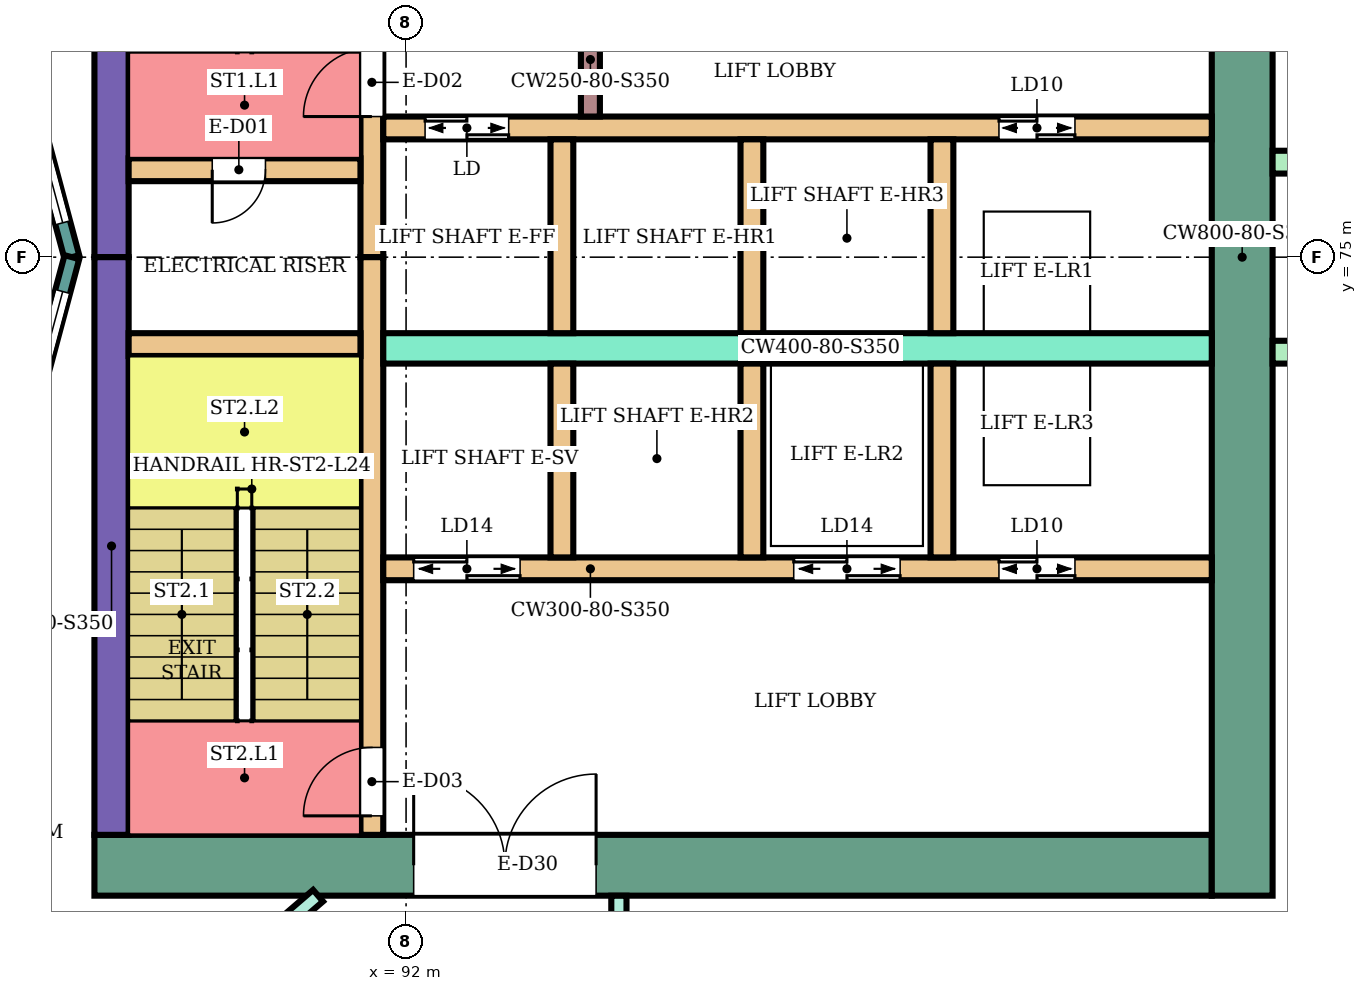
"""IFC4 building model, lengths in metres.
Left out: names, types, materials, properties, quantities, classifications, styles, units other than length and angle.
Written with IfcOpenShell. Run it as: python <this file> out.ifc"""

import sys

from ifc_helpers import new_model, si_unit, direction, frame, frame_2d, origin, place, context, subcontext, project, spatial, rectangle, extrude, element, fill, save


model = new_model("IFC4")
c1 = context("Model", 3, precision=1e-05, world=origin(), true_north=direction((0.0, 1.0)))
c2 = subcontext(c1, "Body", "Model", "MODEL_VIEW")
j1 = project(units=[si_unit("LENGTHUNIT", "METRE"), si_unit("PLANEANGLEUNIT", "RADIAN")], contexts=[c1])
p1 = place(None, origin())
s1 = spatial("IfcSite", under=j1, at=p1, CompositionType="ELEMENT")
p2 = place(p1, origin())
s2 = spatial("IfcBuilding", under=s1, at=p2, CompositionType="ELEMENT")
p3 = place(p2, frame((0.0, 0.0, 105.2)))
s3 = spatial("IfcBuildingStorey", under=s2, at=p3, CompositionType="ELEMENT", Elevation=105.2)
p4 = place(p3, frame((87.9, 67.0, 0.0), z_axis=(0.0, 0.0, 1.0), x_axis=(1.0, 0.0, 0.0)))
e1 = element("IfcWall", 1, at=p4, inside=s3, PredefinedType="SHEAR", context=c2, shape_type="SweptSolid", body=[
    extrude(rectangle(XDim=14.7, YDim=0.8, at=frame_2d((7.35, 0.0))), origin(), (0.0, 0.0, 1.0), 3.45),
])
p5 = place(p4, frame((4.2, 0.0, 0.0)))
e2 = element("IfcOpeningElement", 2, at=p5, cuts=e1, PredefinedType="OPENING", context=c2, shape_type="SweptSolid", body=[
    extrude(rectangle(XDim=2.4, YDim=2.4, at=frame_2d((1.2, 1.2))), frame((0.0, 0.41, 0.0), z_axis=(0.0, -1.0, 0.0), x_axis=(1.0, 0.0, 0.0)), (0.0, 0.0, 1.0), 0.82),
])
for number, where, z_axis, x_axis in (
    (3, (88.125, 75.0, 0.0), (0.0, 0.0, 1.0), (0.0, 1.0, 0.0)),
    (4, (88.125, 67.4, 0.0), (0.0, 0.0, 1.0), (0.0, 1.0, 0.0)),
):
    element("IfcWall", number, at=place(p3, frame(where, z_axis=z_axis, x_axis=x_axis)), inside=s3, PredefinedType="SHEAR", context=c2, shape_type="SweptSolid", body=[
        extrude(rectangle(XDim=7.6, YDim=0.45, at=frame_2d((3.8, 0.0))), origin(), (0.0, 0.0, 1.0), 3.45),
    ])
p6 = place(p3, frame((103.0, 66.6, 0.0), z_axis=(0.0, 0.0, 1.0), x_axis=(0.0, 1.0, 0.0)))
e5 = element("IfcWall", 5, at=p6, inside=s3, PredefinedType="SHEAR", context=c2, shape_type="SweptSolid", body=[
    extrude(rectangle(XDim=16.8, YDim=0.8, at=frame_2d((8.4, 0.0))), origin(), (0.0, 0.0, 1.0), 3.45),
])
p7 = place(p3, frame((91.55, 75.0, 0.0), z_axis=(0.0, 0.0, 1.0), x_axis=(0.0, 1.0, 0.0)))
e6 = element("IfcWall", 6, at=p7, inside=s3, PredefinedType="SHEAR", context=c2, shape_type="SweptSolid", body=[
    extrude(rectangle(XDim=7.6, YDim=0.3, at=frame_2d((3.8, 0.0))), origin(), (0.0, 0.0, 1.0), 3.45),
])
p8 = place(p7, frame((1.85, 0.0, 0.0)))
e7 = element("IfcOpeningElement", 7, at=p8, cuts=e6, PredefinedType="OPENING", context=c2, shape_type="SweptSolid", body=[
    extrude(rectangle(XDim=0.9, YDim=2.1, at=frame_2d((0.45, 1.05))), frame((0.0, 0.16, 0.0), z_axis=(0.0, -1.0, 0.0), x_axis=(1.0, 0.0, 0.0)), (0.0, 0.0, 1.0), 0.32),
])
p9 = place(p3, frame((91.55, 67.4, 0.0), z_axis=(0.0, 0.0, 1.0), x_axis=(0.0, 1.0, 0.0)))
e8 = element("IfcWall", 8, at=p9, inside=s3, PredefinedType="SHEAR", context=c2, shape_type="SweptSolid", body=[
    extrude(rectangle(XDim=7.6, YDim=0.3, at=frame_2d((3.8, 0.0))), origin(), (0.0, 0.0, 1.0), 3.45),
])
p10 = place(p9, frame((0.25, 0.0, 0.0)))
e9 = element("IfcOpeningElement", 9, at=p10, cuts=e8, PredefinedType="OPENING", context=c2, shape_type="SweptSolid", body=[
    extrude(rectangle(XDim=0.9, YDim=2.1, at=frame_2d((0.45, 1.05))), frame((0.0, 0.16, 0.0), z_axis=(0.0, -1.0, 0.0), x_axis=(1.0, 0.0, 0.0)), (0.0, 0.0, 1.0), 0.32),
])
p11 = place(p3, frame((88.35, 76.15, 0.0), z_axis=(0.0, 0.0, 1.0), x_axis=(1.0, 0.0, 0.0)))
e10 = element("IfcWall", 10, at=p11, inside=s3, PredefinedType="SHEAR", context=c2, shape_type="SweptSolid", body=[
    extrude(rectangle(XDim=3.05, YDim=0.3, at=frame_2d((1.525, 0.0))), origin(), (0.0, 0.0, 1.0), 3.45),
])
p12 = place(p11, frame((1.1, 0.0, 0.0)))
e11 = element("IfcOpeningElement", 11, at=p12, cuts=e10, PredefinedType="OPENING", context=c2, shape_type="SweptSolid", body=[
    extrude(rectangle(XDim=0.7, YDim=2.0, at=frame_2d((0.35, 1.0))), frame((0.0, 0.16, 0.0), z_axis=(0.0, -1.0, 0.0), x_axis=(1.0, 0.0, 0.0)), (0.0, 0.0, 1.0), 0.32),
])
p13 = place(p3, frame((88.35, 73.85, 0.0), z_axis=(0.0, 0.0, 1.0), x_axis=(1.0, 0.0, 0.0)))
e12 = element("IfcWall", 12, at=p13, inside=s3, PredefinedType="SHEAR", context=c2, shape_type="SweptSolid", body=[
    extrude(rectangle(XDim=3.05, YDim=0.3, at=frame_2d((1.525, 0.0))), origin(), (0.0, 0.0, 1.0), 3.45),
])
p14 = place(p3, frame((91.7, 76.7, 0.0), z_axis=(0.0, 0.0, 1.0), x_axis=(1.0, 0.0, 0.0)))
e13 = element("IfcWall", 13, at=p14, inside=s3, PredefinedType="SHEAR", context=c2, shape_type="SweptSolid", body=[
    extrude(rectangle(XDim=10.9, YDim=0.3, at=frame_2d((5.45, 0.0))), origin(), (0.0, 0.0, 1.0), 3.45),
])
p15 = place(p14, frame((0.55, 0.0, 0.0)))
e14 = element("IfcOpeningElement", 14, at=p15, cuts=e13, PredefinedType="OPENING", context=c2, shape_type="SweptSolid", body=[
    extrude(rectangle(XDim=1.1, YDim=2.1, at=frame_2d((0.55, 1.05))), frame((0.0, 0.16, 0.0), z_axis=(0.0, -1.0, 0.0), x_axis=(1.0, 0.0, 0.0)), (0.0, 0.0, 1.0), 0.32),
])
p16 = place(p14, frame((8.1, 0.0, 0.0)))
e15 = element("IfcOpeningElement", 15, at=p16, cuts=e13, PredefinedType="OPENING", context=c2, shape_type="SweptSolid", body=[
    extrude(rectangle(XDim=1.0, YDim=2.1, at=frame_2d((0.5, 1.05))), frame((0.0, 0.16, 0.0), z_axis=(0.0, -1.0, 0.0), x_axis=(1.0, 0.0, 0.0)), (0.0, 0.0, 1.0), 0.32),
])
p17 = place(p3, frame((91.7, 73.8, 0.0), z_axis=(0.0, 0.0, 1.0), x_axis=(1.0, 0.0, 0.0)))
e16 = element("IfcWall", 16, at=p17, inside=s3, PredefinedType="SHEAR", context=c2, shape_type="SweptSolid", body=[
    extrude(rectangle(XDim=10.9, YDim=0.4, at=frame_2d((5.45, 0.0))), origin(), (0.0, 0.0, 1.0), 3.45),
])
p18 = place(p3, frame((91.7, 70.9, 0.0), z_axis=(0.0, 0.0, 1.0), x_axis=(1.0, 0.0, 0.0)))
e17 = element("IfcWall", 17, at=p18, inside=s3, PredefinedType="SHEAR", context=c2, shape_type="SweptSolid", body=[
    extrude(rectangle(XDim=10.9, YDim=0.3, at=frame_2d((5.45, 0.0))), origin(), (0.0, 0.0, 1.0), 3.45),
])
p19 = place(p18, frame((0.4, 0.0, 0.0)))
e18 = element("IfcOpeningElement", 18, at=p19, cuts=e17, PredefinedType="OPENING", context=c2, shape_type="SweptSolid", body=[
    extrude(rectangle(XDim=1.4, YDim=2.1, at=frame_2d((0.7, 1.05))), frame((0.0, 0.16, 0.0), z_axis=(0.0, -1.0, 0.0), x_axis=(1.0, 0.0, 0.0)), (0.0, 0.0, 1.0), 0.32),
])
p20 = place(p18, frame((5.4, 0.0, 0.0)))
e19 = element("IfcOpeningElement", 19, at=p20, cuts=e17, PredefinedType="OPENING", context=c2, shape_type="SweptSolid", body=[
    extrude(rectangle(XDim=1.4, YDim=2.1, at=frame_2d((0.7, 1.05))), frame((0.0, 0.16, 0.0), z_axis=(0.0, -1.0, 0.0), x_axis=(1.0, 0.0, 0.0)), (0.0, 0.0, 1.0), 0.32),
])
p21 = place(p18, frame((8.1, 0.0, 0.0)))
e20 = element("IfcOpeningElement", 20, at=p21, cuts=e17, PredefinedType="OPENING", context=c2, shape_type="SweptSolid", body=[
    extrude(rectangle(XDim=1.0, YDim=2.1, at=frame_2d((0.5, 1.05))), frame((0.0, 0.16, 0.0), z_axis=(0.0, -1.0, 0.0), x_axis=(1.0, 0.0, 0.0)), (0.0, 0.0, 1.0), 0.32),
])
for number, where, z_axis, x_axis in (
    (21, (94.05, 74.0, 0.0), (0.0, 0.0, 1.0), (0.0, 1.0, 0.0)),
    (22, (96.55, 74.0, 0.0), (0.0, 0.0, 1.0), (0.0, 1.0, 0.0)),
    (23, (99.05, 74.0, 0.0), (0.0, 0.0, 1.0), (0.0, 1.0, 0.0)),
    (24, (94.05, 71.05, 0.0), (0.0, 0.0, 1.0), (0.0, 1.0, 0.0)),
    (25, (96.55, 71.05, 0.0), (0.0, 0.0, 1.0), (0.0, 1.0, 0.0)),
    (26, (99.05, 71.05, 0.0), (0.0, 0.0, 1.0), (0.0, 1.0, 0.0)),
):
    element("IfcWall", number, at=place(p3, frame(where, z_axis=z_axis, x_axis=x_axis)), inside=s3, PredefinedType="SHEAR", context=c2, shape_type="SweptSolid", body=[
        extrude(rectangle(XDim=2.55, YDim=0.3, at=frame_2d((1.275, 0.0))), origin(), (0.0, 0.0, 1.0), 3.45),
    ])
p22 = place(p3, frame((94.425, 76.85, 0.0), z_axis=(0.0, 0.0, 1.0), x_axis=(0.0, 1.0, 0.0)))
e27 = element("IfcWall", 27, at=p22, inside=s3, PredefinedType="SHEAR", context=c2, shape_type="SweptSolid", body=[
    extrude(rectangle(XDim=1.5, YDim=0.25, at=frame_2d((0.75, 0.0))), origin(), (0.0, 0.0, 1.0), 3.45),
])
for number, where, z_axis, x_axis in (
    (28, (103.4, 73.75, 0.0), (0.0, 0.0, 1.0), (1.0, 0.0, 0.0)),
    (29, (103.4, 76.25, 0.0), (0.0, 0.0, 1.0), (1.0, 0.0, 0.0)),
):
    element("IfcWall", number, at=place(p3, frame(where, z_axis=z_axis, x_axis=x_axis)), inside=s3, PredefinedType="NOTDEFINED", context=c2, shape_type="SweptSolid", body=[
        extrude(rectangle(XDim=2.416, YDim=0.3, at=frame_2d((1.208, 0.0))), origin(), (0.0, 0.0, 1.0), 3.8),
    ])
p23 = place(p3, frame((87.604, 75.0, 0.0), z_axis=(0.0, 0.0, 1.0), x_axis=(-0.258789828301, 0.965933654434, 0.0)))
e30 = element("IfcWall", 30, at=p23, inside=s3, PredefinedType="NOTDEFINED", context=c2, shape_type="SweptSolid", body=[
    extrude(rectangle(XDim=3.936, YDim=0.2, at=frame_2d((1.968, 0.0))), origin(), (0.0, 0.0, 1.0), 3.8),
])
p24 = place(p23, frame((0.468, 0.0, 0.9)))
e31 = element("IfcOpeningElement", 31, at=p24, cuts=e30, PredefinedType="OPENING", context=c2, shape_type="SweptSolid", body=[
    extrude(rectangle(XDim=3.0, YDim=2.3, at=frame_2d((1.5, 1.15))), frame((0.0, 0.11, 0.0), z_axis=(0.0, -1.0, 0.0), x_axis=(1.0, 0.0, 0.0)), (0.0, 0.0, 1.0), 0.22),
])
p25 = place(p3, frame((86.585, 71.198, 0.0), z_axis=(0.0, 0.0, 1.0), x_axis=(0.258789828301, 0.965933654434, 0.0)))
e32 = element("IfcWall", 32, at=p25, inside=s3, PredefinedType="NOTDEFINED", context=c2, shape_type="SweptSolid", body=[
    extrude(rectangle(XDim=3.936, YDim=0.2, at=frame_2d((1.968, 0.0))), origin(), (0.0, 0.0, 1.0), 3.8),
])
p26 = place(p25, frame((0.468, 0.0, 0.9)))
e33 = element("IfcOpeningElement", 33, at=p26, cuts=e32, PredefinedType="OPENING", context=c2, shape_type="SweptSolid", body=[
    extrude(rectangle(XDim=3.0, YDim=2.3, at=frame_2d((1.5, 1.15))), frame((0.0, 0.11, 0.0), z_axis=(0.0, -1.0, 0.0), x_axis=(1.0, 0.0, 0.0)), (0.0, 0.0, 1.0), 0.22),
])
p27 = place(p3, frame((86.877, 63.189, 0.0), z_axis=(0.0, 0.0, 1.0), x_axis=(0.758164888471, 0.652062881853, 0.0)))
e34 = element("IfcWall", 34, at=p27, inside=s3, PredefinedType="PARTITIONING", context=c2, shape_type="SweptSolid", body=[
    extrude(rectangle(XDim=5.23, YDim=0.2, at=frame_2d((2.615, 0.0))), origin(), (0.0, 0.0, 1.0), 3.35),
])
p28 = place(p27, frame((2.63, 0.0, 0.0)))
e35 = element("IfcOpeningElement", 35, at=p28, cuts=e34, PredefinedType="OPENING", context=c2, shape_type="SweptSolid", body=[
    extrude(rectangle(XDim=1.0, YDim=2.1, at=frame_2d((0.5, 1.05))), frame((0.0, 0.11, 0.0), z_axis=(0.0, -1.0, 0.0), x_axis=(1.0, 0.0, 0.0)), (0.0, 0.0, 1.0), 0.22),
])
p29 = place(p3, frame((94.8, 65.1, 0.0), z_axis=(0.0, 0.0, 1.0), x_axis=(0.0, 1.0, 0.0)))
e36 = element("IfcWall", 36, at=p29, inside=s3, PredefinedType="PARTITIONING", context=c2, shape_type="SweptSolid", body=[
    extrude(rectangle(XDim=1.499, YDim=0.2, at=frame_2d((0.75, 0.0))), origin(), (0.0, 0.0, 1.0), 3.35),
])
p30 = place(p3, frame((86.643, 66.681, 0.0), z_axis=(0.0, 0.0, 1.0), x_axis=(0.652264876065, -0.757991115682, 0.0)))
e37 = element("IfcWall", 37, at=p30, inside=s3, PredefinedType="PARTITIONING", context=c2, shape_type="SweptSolid", body=[
    extrude(rectangle(XDim=2.699, YDim=0.1, at=frame_2d((1.35, 0.0))), origin(), (0.0, 0.0, 1.0), 3.35),
])
p31 = place(p30, frame((1.3, 0.0, 0.0)))
e38 = element("IfcOpeningElement", 38, at=p31, cuts=e37, PredefinedType="OPENING", context=c2, shape_type="SweptSolid", body=[
    extrude(rectangle(XDim=0.8, YDim=2.1, at=frame_2d((0.4, 1.05))), frame((0.0, 0.06, 0.0), z_axis=(0.0, -1.0, 0.0), x_axis=(1.0, 0.0, 0.0)), (0.0, 0.0, 1.0), 0.12),
])
p32 = place(p24, origin())
e39 = element("IfcWindow", 39, at=p32, inside=s3, PartitioningType="SINGLE_PANEL", PredefinedType="WINDOW", context=c2, shape_type="SweptSolid", body=[
    extrude(rectangle(XDim=3.0, YDim=2.3, at=frame_2d((1.5, 1.15))), frame((0.0, 0.03, 0.0), z_axis=(0.0, -1.0, 0.0), x_axis=(1.0, 0.0, 0.0)), (0.0, 0.0, 1.0), 0.06),
])
fill(e31, e39)
p33 = place(p26, origin())
e40 = element("IfcWindow", 40, at=p33, inside=s3, PartitioningType="SINGLE_PANEL", PredefinedType="WINDOW", context=c2, shape_type="SweptSolid", body=[
    extrude(rectangle(XDim=3.0, YDim=2.3, at=frame_2d((1.5, 1.15))), frame((0.0, 0.03, 0.0), z_axis=(0.0, -1.0, 0.0), x_axis=(1.0, 0.0, 0.0)), (0.0, 0.0, 1.0), 0.06),
])
fill(e33, e40)
p34 = place(p12, frame((0.7, 0.0, 0.0), z_axis=(0.0, 0.0, 1.0), x_axis=(-1.0, 0.0, 0.0)))
e41 = element("IfcDoor", 41, at=p34, inside=s3, OperationType="SINGLE_SWING_RIGHT", PredefinedType="DOOR", context=c2, shape_type="SweptSolid", body=[
    extrude(rectangle(XDim=0.7, YDim=2.0, at=frame_2d((0.35, 1.0))), frame((0.0, 0.025, 0.0), z_axis=(0.0, -1.0, 0.0), x_axis=(1.0, 0.0, 0.0)), (0.0, 0.0, 1.0), 0.05),
])
fill(e11, e41)
p35 = place(p8, origin())
e42 = element("IfcDoor", 42, at=p35, inside=s3, OperationType="SINGLE_SWING_LEFT", PredefinedType="DOOR", context=c2, shape_type="SweptSolid", body=[
    extrude(rectangle(XDim=0.9, YDim=2.1, at=frame_2d((0.45, 1.05))), frame((0.0, 0.025, 0.0), z_axis=(0.0, -1.0, 0.0), x_axis=(1.0, 0.0, 0.0)), (0.0, 0.0, 1.0), 0.05),
])
fill(e7, e42)
p36 = place(p10, origin())
e43 = element("IfcDoor", 43, at=p36, inside=s3, OperationType="SINGLE_SWING_LEFT", PredefinedType="DOOR", context=c2, shape_type="SweptSolid", body=[
    extrude(rectangle(XDim=0.9, YDim=2.1, at=frame_2d((0.45, 1.05))), frame((0.0, 0.025, 0.0), z_axis=(0.0, -1.0, 0.0), x_axis=(1.0, 0.0, 0.0)), (0.0, 0.0, 1.0), 0.05),
])
fill(e9, e43)
p37 = place(p15, origin())
e44 = element("IfcDoor", 44, at=p37, inside=s3, OperationType="DOUBLE_DOOR_SLIDING", PredefinedType="DOOR", context=c2, shape_type="SweptSolid", body=[
    extrude(rectangle(XDim=1.1, YDim=2.1, at=frame_2d((0.55, 1.05))), frame((0.0, 0.025, 0.0), z_axis=(0.0, -1.0, 0.0), x_axis=(1.0, 0.0, 0.0)), (0.0, 0.0, 1.0), 0.05),
])
fill(e14, e44)
p38 = place(p16, origin())
e45 = element("IfcDoor", 45, at=p38, inside=s3, OperationType="DOUBLE_DOOR_SLIDING", PredefinedType="DOOR", context=c2, shape_type="SweptSolid", body=[
    extrude(rectangle(XDim=1.0, YDim=2.1, at=frame_2d((0.5, 1.05))), frame((0.0, 0.025, 0.0), z_axis=(0.0, -1.0, 0.0), x_axis=(1.0, 0.0, 0.0)), (0.0, 0.0, 1.0), 0.05),
])
fill(e15, e45)
p39 = place(p19, origin())
e46 = element("IfcDoor", 46, at=p39, inside=s3, OperationType="DOUBLE_DOOR_SLIDING", PredefinedType="DOOR", context=c2, shape_type="SweptSolid", body=[
    extrude(rectangle(XDim=1.4, YDim=2.1, at=frame_2d((0.7, 1.05))), frame((0.0, 0.025, 0.0), z_axis=(0.0, -1.0, 0.0), x_axis=(1.0, 0.0, 0.0)), (0.0, 0.0, 1.0), 0.05),
])
fill(e18, e46)
p40 = place(p20, origin())
e47 = element("IfcDoor", 47, at=p40, inside=s3, OperationType="DOUBLE_DOOR_SLIDING", PredefinedType="DOOR", context=c2, shape_type="SweptSolid", body=[
    extrude(rectangle(XDim=1.4, YDim=2.1, at=frame_2d((0.7, 1.05))), frame((0.0, 0.025, 0.0), z_axis=(0.0, -1.0, 0.0), x_axis=(1.0, 0.0, 0.0)), (0.0, 0.0, 1.0), 0.05),
])
fill(e19, e47)
p41 = place(p21, origin())
e48 = element("IfcDoor", 48, at=p41, inside=s3, OperationType="DOUBLE_DOOR_SLIDING", PredefinedType="DOOR", context=c2, shape_type="SweptSolid", body=[
    extrude(rectangle(XDim=1.0, YDim=2.1, at=frame_2d((0.5, 1.05))), frame((0.0, 0.025, 0.0), z_axis=(0.0, -1.0, 0.0), x_axis=(1.0, 0.0, 0.0)), (0.0, 0.0, 1.0), 0.05),
])
fill(e20, e48)
p42 = place(p5, origin())
e49 = element("IfcDoor", 49, at=p42, inside=s3, OperationType="DOUBLE_DOOR_SINGLE_SWING", PredefinedType="DOOR", context=c2, shape_type="SweptSolid", body=[
    extrude(rectangle(XDim=2.4, YDim=2.4, at=frame_2d((1.2, 1.2))), frame((0.0, 0.025, 0.0), z_axis=(0.0, -1.0, 0.0), x_axis=(1.0, 0.0, 0.0)), (0.0, 0.0, 1.0), 0.05),
])
fill(e2, e49)
save(model, sys.argv[1])
